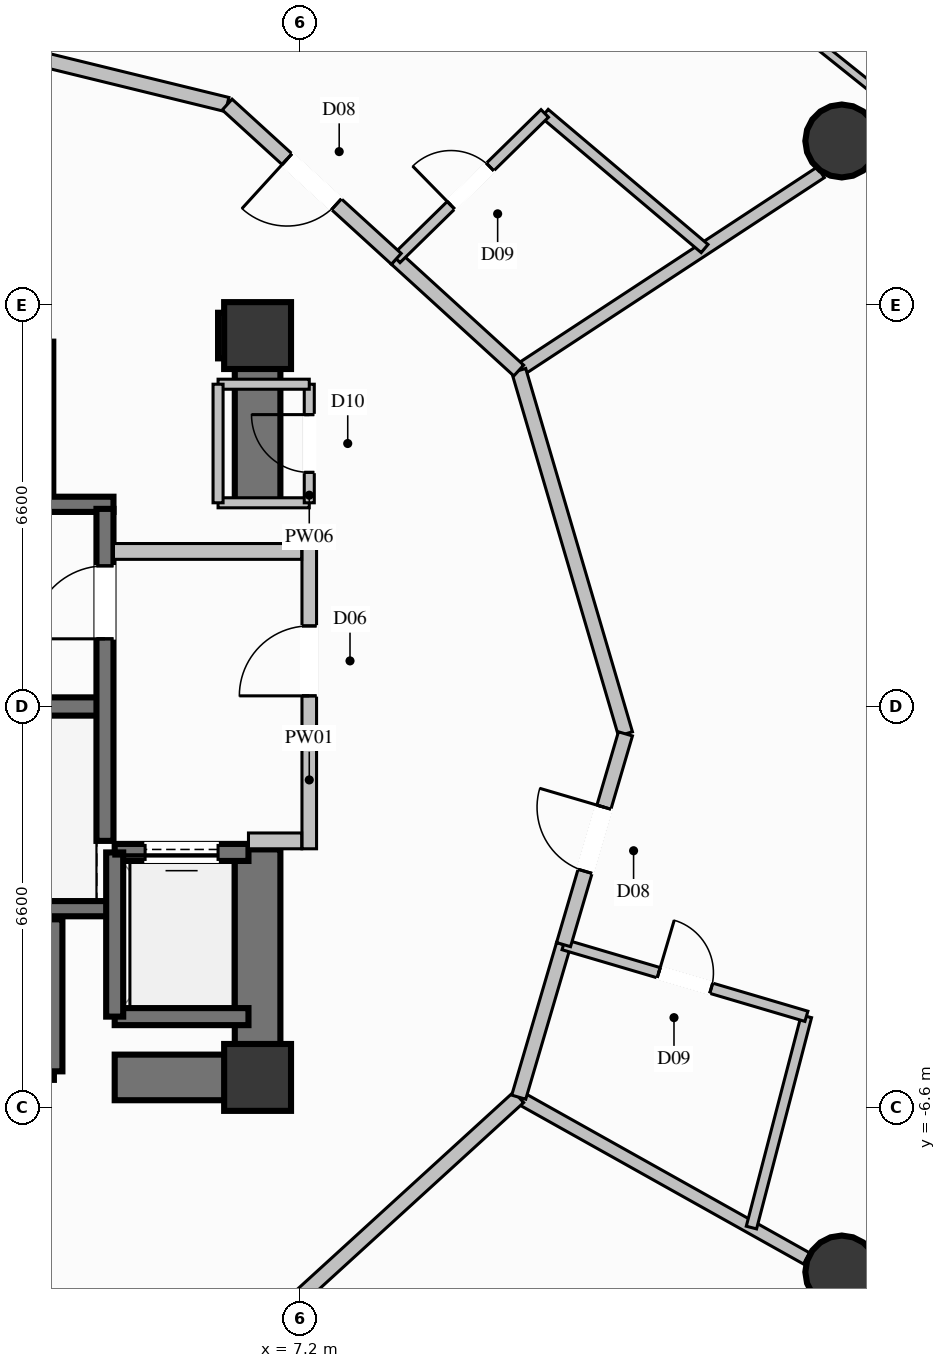
"""IFC4 building model, lengths in metres.
Left out: names, types, materials, properties, quantities, classifications, styles, units other than length and angle.
Written with IfcOpenShell. Run it as: python <this file> out.ifc"""

import sys

from ifc_helpers import new_model, si_unit, direction, frame, frame_2d, origin, origin_2d, place, context, subcontext, project, spatial, rectangle, circle, extrude, element, fill, save


model = new_model("IFC4")
c1 = context("Model", 3, precision=1e-05, world=origin(), true_north=direction((0.0, 1.0)))
c2 = subcontext(c1, "Body", "Model", "MODEL_VIEW")
j1 = project(units=[si_unit("LENGTHUNIT", "METRE"), si_unit("PLANEANGLEUNIT", "RADIAN")], contexts=[c1])
p1 = place(None, origin())
s1 = spatial("IfcSite", under=j1, at=p1, CompositionType="ELEMENT")
p2 = place(p1, origin())
s2 = spatial("IfcBuilding", under=s1, at=p2, CompositionType="ELEMENT")
p3 = place(p2, frame((0.0, 0.0, 68.0)))
s3 = spatial("IfcBuildingStorey", under=s2, at=p3, CompositionType="ELEMENT", Elevation=68.0)
for number, where, z_axis, x_axis in (
    (1, (6.5, -6.1, 0.0), (0.0, 0.0, 1.0), (1.0, 0.0, 0.0)),
    (2, (6.5, 6.1, 0.0), (0.0, 0.0, 1.0), (1.0, 0.0, 0.0)),
):
    element("IfcColumn", number, at=place(p3, frame(where, z_axis=z_axis, x_axis=x_axis)), inside=s3, PredefinedType="COLUMN", context=c2, shape_type="SweptSolid", body=[
        extrude(rectangle(XDim=1.1, YDim=1.1, at=origin_2d()), origin(), (0.0, 0.0, 1.0), 3.6),
    ])
p4 = place(p3, frame((-3.99, 0.0, 0.0), z_axis=(0.0, 0.0, 1.0), x_axis=(1.0, 0.0, 0.0)))
e3 = element("IfcWall", 3, at=p4, inside=s3, PredefinedType="SHEAR", context=c2, shape_type="SweptSolid", body=[
    extrude(rectangle(XDim=7.98, YDim=0.3, at=frame_2d((3.99, 0.0))), origin(), (0.0, 0.0, 1.0), 3.6),
])
for number, where, z_axis, x_axis in (
    (4, (-4.13, -3.325, 0.0), (0.0, 0.0, 1.0), (1.0, 0.0, 0.0)),
    (5, (-4.13, 3.325, 0.0), (0.0, 0.0, 1.0), (1.0, 0.0, 0.0)),
):
    element("IfcWall", number, at=place(p3, frame(where, z_axis=z_axis, x_axis=x_axis)), inside=s3, PredefinedType="SOLIDWALL", context=c2, shape_type="SweptSolid", body=[
        extrude(rectangle(XDim=8.26, YDim=0.25, at=frame_2d((4.13, 0.0))), origin(), (0.0, 0.0, 1.0), 3.6),
    ])
p5 = place(p3, frame((4.15, -6.1, 0.0), z_axis=(0.0, 0.0, 1.0), x_axis=(1.0, 0.0, 0.0)))
e6 = element("IfcWall", 6, at=p5, inside=s3, PredefinedType="SHEAR", context=c2, shape_type="SweptSolid", body=[
    extrude(rectangle(XDim=1.975, YDim=0.75, at=frame_2d((0.988, 0.0))), origin(), (0.0, 0.0, 1.0), 3.6),
])
p6 = place(p3, frame((5.85, 6.1, 0.0), z_axis=(0.0, 0.0, 1.0), x_axis=(1.0, 0.0, 0.0)))
e7 = element("IfcWall", 7, at=p6, inside=s3, PredefinedType="SHEAR", context=c2, shape_type="SweptSolid", body=[
    extrude(rectangle(XDim=0.275, YDim=0.75, at=frame_2d((0.137, 0.0))), origin(), (0.0, 0.0, 1.0), 3.6),
])
p7 = place(p3, frame((6.5, -6.475, 0.0), z_axis=(0.0, 0.0, 1.0), x_axis=(0.0, 1.0, 0.0)))
e8 = element("IfcWall", 8, at=p7, inside=s3, PredefinedType="SHEAR", context=c2, shape_type="SweptSolid", body=[
    extrude(rectangle(XDim=4.125, YDim=0.75, at=frame_2d((2.062, 0.0))), origin(), (0.0, 0.0, 1.0), 3.6),
])
p8 = place(p3, frame((6.5, 3.35, 0.0), z_axis=(0.0, 0.0, 1.0), x_axis=(0.0, 1.0, 0.0)))
e9 = element("IfcWall", 9, at=p8, inside=s3, PredefinedType="SHEAR", context=c2, shape_type="SweptSolid", body=[
    extrude(rectangle(XDim=3.125, YDim=0.75, at=frame_2d((1.562, 0.0))), origin(), (0.0, 0.0, 1.0), 3.6),
])
for number, where, z_axis, x_axis in (
    (10, (16.108, 9.3, 0.0), (0.0, 0.0, 1.0), (1.0, 0.0, 0.0)),
    (11, (16.108, -9.3, 0.0), (0.0, 0.0, 1.0), (1.0, 0.0, 0.0)),
):
    element("IfcColumn", number, at=place(p3, frame(where, z_axis=z_axis, x_axis=x_axis)), inside=s3, PredefinedType="COLUMN", context=c2, shape_type="SweptSolid", body=[
        extrude(circle(Radius=0.6, at=origin_2d()), origin(), (0.0, 0.0, 1.0), 3.6),
    ])
p9 = place(p3, frame((1.05, -6.0, 0.0), z_axis=(0.0, 0.0, 1.0), x_axis=(1.0, 0.0, 0.0)))
e12 = element("IfcWall", 12, at=p9, inside=s3, PredefinedType="SOLIDWALL", context=c2, shape_type="SweptSolid", body=[
    extrude(rectangle(XDim=2.1, YDim=0.28, at=frame_2d((1.05, 0.0))), origin(), (0.0, 0.0, 1.0), 3.34),
])
for number, where, z_axis, x_axis in (
    (13, (3.15, -6.0, 0.0), (0.0, 0.0, 1.0), (0.0, 1.0, 0.0)),
    (14, (3.0, 3.5, 0.0), (0.0, 0.0, 1.0), (0.0, 1.0, 0.0)),
):
    element("IfcWall", number, at=place(p3, frame(where, z_axis=z_axis, x_axis=x_axis)), inside=s3, PredefinedType="SOLIDWALL", context=c2, shape_type="SweptSolid", body=[
        extrude(rectangle(XDim=2.5, YDim=0.28, at=frame_2d((1.25, 0.0))), origin(), (0.0, 0.0, 1.0), 3.34),
    ])
p10 = place(p3, frame((4.15, -5.1, 0.0), z_axis=(0.0, 0.0, 1.0), x_axis=(1.0, 0.0, 0.0)))
e15 = element("IfcWall", 15, at=p10, inside=s3, PredefinedType="SOLIDWALL", context=c2, shape_type="SweptSolid", body=[
    extrude(rectangle(XDim=2.2, YDim=0.28, at=frame_2d((1.1, 0.0))), origin(), (0.0, 0.0, 1.0), 3.34),
])
p11 = place(p3, frame((6.35, -2.4, 0.0), z_axis=(0.0, 0.0, 1.0), x_axis=(-1.0, 0.0, 0.0)))
e16 = element("IfcWall", 16, at=p11, inside=s3, PredefinedType="SOLIDWALL", context=c2, shape_type="SweptSolid", body=[
    extrude(rectangle(XDim=2.2, YDim=0.28, at=frame_2d((1.1, 0.0))), origin(), (0.0, 0.0, 1.0), 3.34),
])
p12 = place(p11, frame((0.5, 0.0, 0.0)))
e17 = element("IfcOpeningElement", 17, at=p12, cuts=e16, PredefinedType="OPENING", context=c2, shape_type="SweptSolid", body=[
    extrude(rectangle(XDim=1.2, YDim=2.2, at=frame_2d((0.6, 1.1))), frame((0.0, 0.15, 0.0), z_axis=(0.0, -1.0, 0.0), x_axis=(1.0, 0.0, 0.0)), (0.0, 0.0, 1.0), 0.3),
])
p13 = place(p3, frame((4.15, -2.4, 0.0), z_axis=(0.0, 0.0, 1.0), x_axis=(0.0, -1.0, 0.0)))
e18 = element("IfcWall", 18, at=p13, inside=s3, PredefinedType="SOLIDWALL", context=c2, shape_type="SweptSolid", body=[
    extrude(rectangle(XDim=2.7, YDim=0.28, at=frame_2d((1.35, 0.0))), origin(), (0.0, 0.0, 1.0), 3.34),
])
p14 = place(p3, frame((3.99, -2.21, 0.0), z_axis=(0.0, 0.0, 1.0), x_axis=(0.0, 1.0, 0.0)))
e19 = element("IfcWall", 19, at=p14, inside=s3, PredefinedType="SOLIDWALL", context=c2, shape_type="SweptSolid", body=[
    extrude(rectangle(XDim=5.46, YDim=0.28, at=frame_2d((2.73, 0.0))), origin(), (0.0, 0.0, 1.0), 3.34),
])
p15 = place(p14, frame((3.323, 0.0, 0.0)))
e20 = element("IfcOpeningElement", 20, at=p15, cuts=e19, PredefinedType="OPENING", context=c2, shape_type="SweptSolid", body=[
    extrude(rectangle(XDim=1.2, YDim=2.2, at=frame_2d((0.6, 1.1))), frame((0.0, 0.15, 0.0), z_axis=(0.0, -1.0, 0.0), x_axis=(1.0, 0.0, 0.0)), (0.0, 0.0, 1.0), 0.3),
])
p16 = place(p3, frame((7.35, -2.34, 0.0), z_axis=(0.0, 0.0, 1.0), x_axis=(0.0, 1.0, 0.0)))
e21 = element("IfcWall", 21, at=p16, inside=s3, PredefinedType="PARTITIONING", context=c2, shape_type="SweptSolid", body=[
    extrude(rectangle(XDim=5.02, YDim=0.24, at=frame_2d((2.51, 0.0))), origin(), (0.0, 0.0, 1.0), 2.425),
])
p17 = place(p16, frame((2.515, 0.0, 0.0)))
e22 = element("IfcOpeningElement", 22, at=p17, cuts=e21, PredefinedType="OPENING", context=c2, shape_type="SweptSolid", body=[
    extrude(rectangle(XDim=1.15, YDim=2.2, at=frame_2d((0.575, 1.1))), frame((0.0, 0.13, 0.0), z_axis=(0.0, -1.0, 0.0), x_axis=(1.0, 0.0, 0.0)), (0.0, 0.0, 1.0), 0.26),
])
p18 = place(p3, frame((6.35, -2.21, 0.0), z_axis=(0.0, 0.0, 1.0), x_axis=(1.0, 0.0, 0.0)))
e23 = element("IfcWall", 23, at=p18, inside=s3, PredefinedType="PARTITIONING", context=c2, shape_type="SweptSolid", body=[
    extrude(rectangle(XDim=0.875, YDim=0.26, at=frame_2d((0.438, 0.0))), origin(), (0.0, 0.0, 1.0), 3.34),
])
p19 = place(p3, frame((4.13, 2.55, 0.0), z_axis=(0.0, 0.0, 1.0), x_axis=(1.0, 0.0, 0.0)))
e24 = element("IfcWall", 24, at=p19, inside=s3, PredefinedType="PARTITIONING", context=c2, shape_type="SweptSolid", body=[
    extrude(rectangle(XDim=3.095, YDim=0.26, at=frame_2d((1.548, 0.0))), origin(), (0.0, 0.0, 1.0), 3.34),
])
p20 = place(p3, frame((5.85, 3.35, 0.0), z_axis=(0.0, 0.0, 1.0), x_axis=(1.0, 0.0, 0.0)))
e25 = element("IfcWall", 25, at=p20, inside=s3, PredefinedType="PARTITIONING", context=c2, shape_type="SweptSolid", body=[
    extrude(rectangle(XDim=1.5, YDim=0.165, at=frame_2d((0.75, 0.0))), origin(), (0.0, 0.0, 1.0), 3.34),
])
p21 = place(p3, frame((7.35, 3.35, 0.0), z_axis=(0.0, 0.0, 1.0), x_axis=(0.0, 1.0, 0.0)))
e26 = element("IfcWall", 26, at=p21, inside=s3, PredefinedType="PARTITIONING", context=c2, shape_type="SweptSolid", body=[
    extrude(rectangle(XDim=1.95, YDim=0.165, at=frame_2d((0.975, 0.0))), origin(), (0.0, 0.0, 1.0), 3.34),
])
p22 = place(p21, frame((0.5, 0.0, 0.0)))
e27 = element("IfcOpeningElement", 27, at=p22, cuts=e26, PredefinedType="OPENING", context=c2, shape_type="SweptSolid", body=[
    extrude(rectangle(XDim=0.95, YDim=2.1, at=frame_2d((0.475, 1.05))), frame((0.0, 0.093, 0.0), z_axis=(0.0, -1.0, 0.0), x_axis=(1.0, 0.0, 0.0)), (0.0, 0.0, 1.0), 0.185),
])
p23 = place(p3, frame((7.35, 5.3, 0.0), z_axis=(0.0, 0.0, 1.0), x_axis=(-1.0, 0.0, 0.0)))
e28 = element("IfcWall", 28, at=p23, inside=s3, PredefinedType="PARTITIONING", context=c2, shape_type="SweptSolid", body=[
    extrude(rectangle(XDim=1.5, YDim=0.165, at=frame_2d((0.75, 0.0))), origin(), (0.0, 0.0, 1.0), 2.425),
])
p24 = place(p3, frame((5.85, 5.3, 0.0), z_axis=(0.0, 0.0, 1.0), x_axis=(0.0, -1.0, 0.0)))
e29 = element("IfcWall", 29, at=p24, inside=s3, PredefinedType="PARTITIONING", context=c2, shape_type="SweptSolid", body=[
    extrude(rectangle(XDim=1.95, YDim=0.165, at=frame_2d((0.975, 0.0))), origin(), (0.0, 0.0, 1.0), 2.425),
])
p25 = place(p3, frame((10.795, 5.525, 0.0), z_axis=(0.0, 0.0, 1.0), x_axis=(0.836067345727, 0.548626825273, 0.0)))
e30 = element("IfcWall", 30, at=p25, inside=s3, PredefinedType="PARTITIONING", context=c2, shape_type="SweptSolid", body=[
    extrude(rectangle(XDim=5.942, YDim=0.21, at=frame_2d((2.971, 0.0))), origin(), (0.0, 0.0, 1.0), 2.709),
])
p26 = place(p3, frame((10.795, -6.425, 0.0), z_axis=(0.0, 0.0, 1.0), x_axis=(0.872447700458, -0.488707489164, 0.0)))
e31 = element("IfcWall", 31, at=p26, inside=s3, PredefinedType="PARTITIONING", context=c2, shape_type="SweptSolid", body=[
    extrude(rectangle(XDim=5.426, YDim=0.21, at=frame_2d((2.713, 0.0))), origin(), (0.0, 0.0, 1.0), 2.709),
])
p27 = place(p3, frame((6.0, -10.799, 0.0), z_axis=(0.0, 0.0, 1.0), x_axis=(0.73878836807, 0.673937495028, 0.0)))
e32 = element("IfcWall", 32, at=p27, inside=s3, PredefinedType="PARTITIONING", context=c2, shape_type="SweptSolid", body=[
    extrude(rectangle(XDim=6.49, YDim=0.24, at=frame_2d((3.245, 0.0))), origin(), (0.0, 0.0, 1.0), 3.34),
])
p28 = place(p3, frame((10.795, -6.425, 0.0), z_axis=(0.0, 0.0, 1.0), x_axis=(0.281852929568, 0.959457620791, 0.0)))
e33 = element("IfcWall", 33, at=p28, inside=s3, PredefinedType="PARTITIONING", context=c2, shape_type="SweptSolid", body=[
    extrude(rectangle(XDim=2.615, YDim=0.24, at=frame_2d((1.308, 0.0))), origin(), (0.0, 0.0, 1.0), 3.34),
])
p29 = place(p3, frame((14.622, -8.569, 0.0), z_axis=(0.0, 0.0, 1.0), x_axis=(0.251773997666, 0.967786058021, 0.0)))
e34 = element("IfcWall", 34, at=p29, inside=s3, PredefinedType="PLUMBINGWALL", context=c2, shape_type="SweptSolid", body=[
    extrude(rectangle(XDim=3.59, YDim=0.175, at=frame_2d((1.795, 0.0))), origin(), (0.0, 0.0, 1.0), 3.34),
])
p30 = place(p3, frame((11.532, -3.916, 0.0), z_axis=(0.0, 0.0, 1.0), x_axis=(0.959086834847, -0.28311206831, 0.0)))
e35 = element("IfcWall", 35, at=p30, inside=s3, PredefinedType="PLUMBINGWALL", context=c2, shape_type="SweptSolid", body=[
    extrude(rectangle(XDim=4.164, YDim=0.175, at=frame_2d((2.082, 0.0))), origin(), (0.0, 0.0, 1.0), 3.34),
])
p31 = place(p30, frame((1.632, 0.0, 0.0)))
e36 = element("IfcOpeningElement", 36, at=p31, cuts=e35, PredefinedType="OPENING", context=c2, shape_type="SweptSolid", body=[
    extrude(rectangle(XDim=0.9, YDim=2.1, at=frame_2d((0.45, 1.05))), frame((0.0, 0.098, 0.0), z_axis=(0.0, -1.0, 0.0), x_axis=(1.0, 0.0, 0.0)), (0.0, 0.0, 1.0), 0.195),
])
p32 = place(p3, frame((12.55, -0.45, 0.0), z_axis=(0.0, 0.0, 1.0), x_axis=(-0.281843679574, 0.959460338046, 0.0)))
e37 = element("IfcWall", 37, at=p32, inside=s3, PredefinedType="PARTITIONING", context=c2, shape_type="SweptSolid", body=[
    extrude(rectangle(XDim=6.227, YDim=0.24, at=frame_2d((3.114, 0.0))), origin(), (0.0, 0.0, 1.0), 3.34),
])
p33 = place(p3, frame((11.532, -3.916, 0.0), z_axis=(0.0, 0.0, 1.0), x_axis=(0.281818707972, 0.959467673159, 0.0)))
e38 = element("IfcWall", 38, at=p33, inside=s3, PredefinedType="PARTITIONING", context=c2, shape_type="SweptSolid", body=[
    extrude(rectangle(XDim=3.613, YDim=0.24, at=frame_2d((1.806, 0.0))), origin(), (0.0, 0.0, 1.0), 3.34),
])
p34 = place(p33, frame((1.256, 0.0, 0.0)))
e39 = element("IfcOpeningElement", 39, at=p34, cuts=e38, PredefinedType="OPENING", context=c2, shape_type="SweptSolid", body=[
    extrude(rectangle(XDim=1.1, YDim=2.3, at=frame_2d((0.55, 1.15))), frame((0.0, 0.13, 0.0), z_axis=(0.0, -1.0, 0.0), x_axis=(1.0, 0.0, 0.0)), (0.0, 0.0, 1.0), 0.26),
])
p35 = place(p3, frame((10.795, 5.525, 0.0), z_axis=(0.0, 0.0, 1.0), x_axis=(-0.738784017848, 0.673942263827, 0.0)))
e40 = element("IfcWall", 40, at=p35, inside=s3, PredefinedType="PARTITIONING", context=c2, shape_type="SweptSolid", body=[
    extrude(rectangle(XDim=2.726, YDim=0.24, at=frame_2d((1.363, 0.0))), origin(), (0.0, 0.0, 1.0), 3.34),
])
p36 = place(p3, frame((13.852, 7.531, 0.0), z_axis=(0.0, 0.0, 1.0), x_axis=(-0.76377891562, 0.645477937697, 0.0)))
e41 = element("IfcWall", 41, at=p36, inside=s3, PredefinedType="PLUMBINGWALL", context=c2, shape_type="SweptSolid", body=[
    extrude(rectangle(XDim=3.442, YDim=0.175, at=frame_2d((1.721, 0.0))), origin(), (0.0, 0.0, 1.0), 3.34),
])
p37 = place(p3, frame((8.781, 7.362, 0.0), z_axis=(0.0, 0.0, 1.0), x_axis=(0.714532745867, 0.699601997628, 0.0)))
e42 = element("IfcWall", 42, at=p37, inside=s3, PredefinedType="PLUMBINGWALL", context=c2, shape_type="SweptSolid", body=[
    extrude(rectangle(XDim=3.417, YDim=0.175, at=frame_2d((1.709, 0.0))), origin(), (0.0, 0.0, 1.0), 2.709),
])
p38 = place(p37, frame((1.259, 0.0, 0.0)))
e43 = element("IfcOpeningElement", 43, at=p38, cuts=e42, PredefinedType="OPENING", context=c2, shape_type="SweptSolid", body=[
    extrude(rectangle(XDim=0.9, YDim=2.1, at=frame_2d((0.45, 1.05))), frame((0.0, 0.098, 0.0), z_axis=(0.0, -1.0, 0.0), x_axis=(1.0, 0.0, 0.0)), (0.0, 0.0, 1.0), 0.195),
])
p39 = place(p3, frame((6.0, 9.899, 0.0), z_axis=(0.0, 0.0, 1.0), x_axis=(-0.971400676792, 0.237446257348, 0.0)))
e44 = element("IfcWall", 44, at=p39, inside=s3, PredefinedType="PARTITIONING", context=c2, shape_type="SweptSolid", body=[
    extrude(rectangle(XDim=6.743, YDim=0.24, at=frame_2d((3.372, 0.0))), origin(), (0.0, 0.0, 1.0), 3.34),
])
p40 = place(p3, frame((8.781, 7.362, 0.0), z_axis=(0.0, 0.0, 1.0), x_axis=(-0.738791518375, 0.673934041562, 0.0)))
e45 = element("IfcWall", 45, at=p40, inside=s3, PredefinedType="PARTITIONING", context=c2, shape_type="SweptSolid", body=[
    extrude(rectangle(XDim=3.764, YDim=0.24, at=frame_2d((1.882, 0.0))), origin(), (0.0, 0.0, 1.0), 3.34),
])
p41 = place(p40, frame((1.332, 0.0, 0.0)))
e46 = element("IfcOpeningElement", 46, at=p41, cuts=e45, PredefinedType="OPENING", context=c2, shape_type="SweptSolid", body=[
    extrude(rectangle(XDim=1.1, YDim=2.3, at=frame_2d((0.55, 1.15))), frame((0.0, 0.13, 0.0), z_axis=(0.0, -1.0, 0.0), x_axis=(1.0, 0.0, 0.0)), (0.0, 0.0, 1.0), 0.26),
])
p42 = place(p3, frame((17.179, 9.713, 0.0), z_axis=(0.0, 0.0, 1.0), x_axis=(-0.780480528916, 0.625180089241, 0.0)))
e47 = element("IfcWall", 47, at=p42, inside=s3, PredefinedType="PARTITIONING", context=c2, shape_type="SweptSolid", body=[
    extrude(rectangle(XDim=10.064, YDim=0.135, at=frame_2d((5.032, 0.0))), origin(), (0.0, 0.0, 1.0), 2.793),
])
p43 = place(p42, frame((4.557, 0.0, 0.0)))
e48 = element("IfcOpeningElement", 48, at=p43, cuts=e47, PredefinedType="OPENING", context=c2, shape_type="SweptSolid", body=[
    extrude(rectangle(XDim=0.95, YDim=2.1, at=frame_2d((0.475, 1.05))), frame((0.0, 0.078, 0.0), z_axis=(0.0, -1.0, 0.0), x_axis=(1.0, 0.0, 0.0)), (0.0, 0.0, 1.0), 0.155),
])
p44 = place(p12, origin())
e49 = element("IfcDoor", 49, at=p44, inside=s3, OperationType="SLIDING_TO_LEFT", PredefinedType="DOOR", context=c2, shape_type="SweptSolid", body=[
    extrude(rectangle(XDim=1.2, YDim=2.2, at=frame_2d((0.6, 1.1))), frame((0.0, 0.025, 0.0), z_axis=(0.0, -1.0, 0.0), x_axis=(1.0, 0.0, 0.0)), (0.0, 0.0, 1.0), 0.05),
])
fill(e17, e49)
p45 = place(p15, origin())
e50 = element("IfcDoor", 50, at=p45, inside=s3, OperationType="SINGLE_SWING_LEFT", PredefinedType="DOOR", context=c2, shape_type="SweptSolid", body=[
    extrude(rectangle(XDim=1.2, YDim=2.2, at=frame_2d((0.6, 1.1))), frame((0.0, 0.025, 0.0), z_axis=(0.0, -1.0, 0.0), x_axis=(1.0, 0.0, 0.0)), (0.0, 0.0, 1.0), 0.05),
])
fill(e20, e50)
p46 = place(p17, origin())
e51 = element("IfcDoor", 51, at=p46, inside=s3, OperationType="SINGLE_SWING_LEFT", PredefinedType="DOOR", context=c2, shape_type="SweptSolid", body=[
    extrude(rectangle(XDim=1.15, YDim=2.2, at=frame_2d((0.575, 1.1))), frame((0.0, 0.025, 0.0), z_axis=(0.0, -1.0, 0.0), x_axis=(1.0, 0.0, 0.0)), (0.0, 0.0, 1.0), 0.05),
])
fill(e22, e51)
p47 = place(p22, origin())
e52 = element("IfcDoor", 52, at=p47, inside=s3, OperationType="SINGLE_SWING_RIGHT", PredefinedType="DOOR", context=c2, shape_type="SweptSolid", body=[
    extrude(rectangle(XDim=0.95, YDim=2.1, at=frame_2d((0.475, 1.05))), frame((0.0, 0.025, 0.0), z_axis=(0.0, -1.0, 0.0), x_axis=(1.0, 0.0, 0.0)), (0.0, 0.0, 1.0), 0.05),
])
fill(e27, e52)
p48 = place(p31, origin())
e53 = element("IfcDoor", 53, at=p48, inside=s3, OperationType="SINGLE_SWING_LEFT", PredefinedType="DOOR", context=c2, shape_type="SweptSolid", body=[
    extrude(rectangle(XDim=0.9, YDim=2.1, at=frame_2d((0.45, 1.05))), frame((0.0, 0.025, 0.0), z_axis=(0.0, -1.0, 0.0), x_axis=(1.0, 0.0, 0.0)), (0.0, 0.0, 1.0), 0.05),
])
fill(e36, e53)
p49 = place(p34, origin())
e54 = element("IfcDoor", 54, at=p49, inside=s3, OperationType="SINGLE_SWING_RIGHT", PredefinedType="DOOR", context=c2, shape_type="SweptSolid", body=[
    extrude(rectangle(XDim=1.1, YDim=2.3, at=frame_2d((0.55, 1.15))), frame((0.0, 0.025, 0.0), z_axis=(0.0, -1.0, 0.0), x_axis=(1.0, 0.0, 0.0)), (0.0, 0.0, 1.0), 0.05),
])
fill(e39, e54)
p50 = place(p38, origin())
e55 = element("IfcDoor", 55, at=p50, inside=s3, OperationType="SINGLE_SWING_LEFT", PredefinedType="DOOR", context=c2, shape_type="SweptSolid", body=[
    extrude(rectangle(XDim=0.9, YDim=2.1, at=frame_2d((0.45, 1.05))), frame((0.0, 0.025, 0.0), z_axis=(0.0, -1.0, 0.0), x_axis=(1.0, 0.0, 0.0)), (0.0, 0.0, 1.0), 0.05),
])
fill(e43, e55)
p51 = place(p41, origin())
e56 = element("IfcDoor", 56, at=p51, inside=s3, OperationType="SINGLE_SWING_RIGHT", PredefinedType="DOOR", context=c2, shape_type="SweptSolid", body=[
    extrude(rectangle(XDim=1.1, YDim=2.3, at=frame_2d((0.55, 1.15))), frame((0.0, 0.025, 0.0), z_axis=(0.0, -1.0, 0.0), x_axis=(1.0, 0.0, 0.0)), (0.0, 0.0, 1.0), 0.05),
])
fill(e46, e56)
save(model, sys.argv[1])
